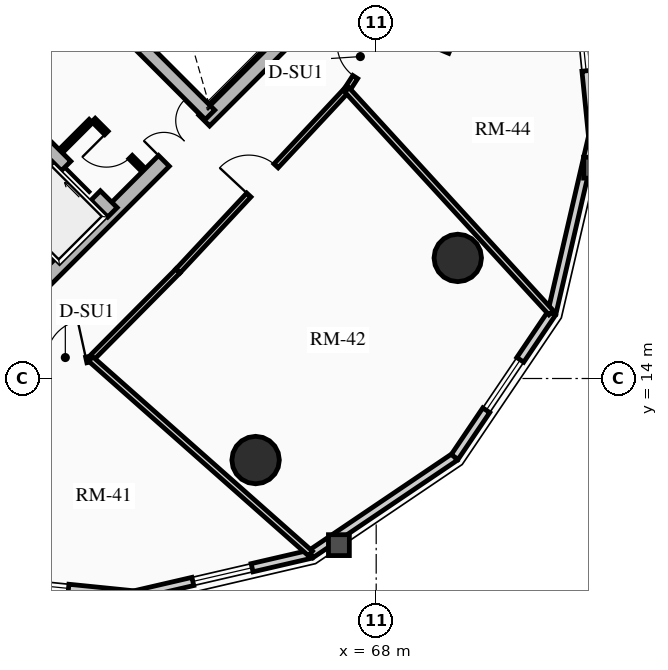
"""IFC4 building model, lengths in metres.
Left out: names, types, materials, properties, quantities, classifications, styles, units other than length and angle.
Written with IfcOpenShell. Run it as: python <this file> out.ifc"""

import sys

from ifc_helpers import new_model, si_unit, direction, frame, frame_2d, origin, origin_2d, place, context, subcontext, project, spatial, rectangle, circle, extrude, source, transform, mapped, element, fill, save


model = new_model("IFC4")
c1 = context("Model", 3, precision=1e-05, world=origin(), true_north=direction((0.0, 1.0)))
c2 = subcontext(c1, "Body", "Model", "MODEL_VIEW")
j1 = project(units=[si_unit("LENGTHUNIT", "METRE"), si_unit("PLANEANGLEUNIT", "RADIAN")], contexts=[c1])
p1 = place(None, origin())
s1 = spatial("IfcSite", under=j1, at=p1, CompositionType="ELEMENT")
p2 = place(p1, origin())
s2 = spatial("IfcBuilding", under=s1, at=p2, CompositionType="ELEMENT")
p3 = place(p2, frame((0.0, 0.0, 157.42)))
s3 = spatial("IfcBuildingStorey", under=s2, at=p3, CompositionType="ELEMENT", Elevation=157.42)
p4 = place(p3, frame((58.561, 15.873, 0.0), z_axis=(0.0, 0.0, 1.0), x_axis=(0.707106781187, 0.707106781187, 0.0)))
e1 = element("IfcWall", 1, at=p4, inside=s3, PredefinedType="SHEAR", context=c2, shape_type="SweptSolid", body=[
    extrude(rectangle(XDim=10.7, YDim=0.4, at=frame_2d((5.35, 0.0))), origin(), (0.0, 0.0, 1.0), 2.91),
])
m1 = source(origin(), c2, "Body", "SweptSolid", [
    extrude(rectangle(XDim=1.5, YDim=2.02, at=frame_2d((0.75, 1.01))), frame((0.0, 0.21, 0.0), z_axis=(0.0, -1.0, 0.0), x_axis=(1.0, 0.0, 0.0)), (0.0, 0.0, 1.0), 0.42),
])
p5 = place(p4, frame((5.45, 0.0, 0.0)))
e2 = element("IfcOpeningElement", 2, at=p5, cuts=e1, PredefinedType="OPENING", context=c2, shape_type="MappedRepresentation", body=[
    mapped(m1, transform((0.0, 0.0, 0.0), x_axis=(1.0, 0.0, 0.0), y_axis=(0.0, 1.0, 0.0), z_axis=(0.0, 0.0, 1.0), scale=1.0)),
])
p6 = place(p3, frame((61.06, 18.373, 0.0), z_axis=(0.0, 0.0, 1.0), x_axis=(-0.707106781187, 0.707106781187, 0.0)))
e3 = element("IfcWall", 3, at=p6, inside=s3, PredefinedType="SHEAR", context=c2, shape_type="SweptSolid", body=[
    extrude(rectangle(XDim=13.7, YDim=0.35, at=frame_2d((6.85, 0.0))), origin(), (0.0, 0.0, 1.0), 2.91),
])
m2 = source(origin(), c2, "Body", "SweptSolid", [
    extrude(rectangle(XDim=1.1, YDim=2.015, at=frame_2d((0.55, 1.007))), frame((0.0, 0.185, 0.0), z_axis=(0.0, -1.0, 0.0), x_axis=(1.0, 0.0, 0.0)), (0.0, 0.0, 1.0), 0.37),
])
p7 = place(p6, frame((4.85, 0.0, 0.0)))
e4 = element("IfcOpeningElement", 4, at=p7, cuts=e3, PredefinedType="OPENING", context=c2, shape_type="MappedRepresentation", body=[
    mapped(m2, transform((0.0, 0.0, 0.0), x_axis=(1.0, 0.0, 0.0), y_axis=(0.0, 1.0, 0.0), z_axis=(0.0, 0.0, 1.0), scale=1.0)),
])
p8 = place(p6, frame((0.625, 0.0, 0.0)))
e5 = element("IfcOpeningElement", 5, at=p8, cuts=e3, PredefinedType="OPENING", context=c2, shape_type="MappedRepresentation", body=[
    mapped(m2, transform((0.0, 0.0, 0.0), x_axis=(1.0, 0.0, 0.0), y_axis=(0.0, 1.0, 0.0), z_axis=(0.0, 0.0, 1.0), scale=1.0)),
])
p9 = place(p6, frame((2.625, 0.0, 0.0)))
e6 = element("IfcOpeningElement", 6, at=p9, cuts=e3, PredefinedType="OPENING", context=c2, shape_type="MappedRepresentation", body=[
    mapped(m2, transform((0.0, 0.0, 0.0), x_axis=(1.0, 0.0, 0.0), y_axis=(0.0, 1.0, 0.0), z_axis=(0.0, 0.0, 1.0), scale=1.0)),
])
m3 = source(origin(), c2, "Body", "SweptSolid", [
    extrude(rectangle(XDim=1.15, YDim=2.02, at=frame_2d((0.575, 1.01))), frame((0.0, 0.185, 0.0), z_axis=(0.0, -1.0, 0.0), x_axis=(1.0, 0.0, 0.0)), (0.0, 0.0, 1.0), 0.37),
])
p10 = place(p6, frame((7.27, 0.0, 0.0)))
e7 = element("IfcOpeningElement", 7, at=p10, cuts=e3, PredefinedType="OPENING", context=c2, shape_type="MappedRepresentation", body=[
    mapped(m3, transform((0.0, 0.0, 0.0), x_axis=(1.0, 0.0, 0.0), y_axis=(0.0, 1.0, 0.0), z_axis=(0.0, 0.0, 1.0), scale=1.0)),
])
p11 = place(p3, frame((63.627, 20.94, 0.0), z_axis=(0.0, 0.0, 1.0), x_axis=(-0.707119496762, 0.707094065383, 0.0)))
e8 = element("IfcWall", 8, at=p11, inside=s3, PredefinedType="SHEAR", context=c2, shape_type="SweptSolid", body=[
    extrude(rectangle(XDim=9.6, YDim=0.35, at=frame_2d((4.8, 0.0))), origin(), (0.0, 0.0, 1.0), 2.91),
])
p12 = place(p11, frame((5.28, 0.0, 0.0)))
e9 = element("IfcOpeningElement", 9, at=p12, cuts=e8, PredefinedType="OPENING", context=c2, shape_type="MappedRepresentation", body=[
    mapped(m3, transform((0.0, 0.0, 0.0), x_axis=(1.0, 0.0, 0.0), y_axis=(0.0, 1.0, 0.0), z_axis=(0.0, 0.0, 1.0), scale=1.0)),
])
for number, where, z_axis, x_axis in (
    (10, (64.827, 11.854, 0.0), (0.0, 0.0, 1.0), (1.0, 0.0, 0.0)),
    (11, (70.146, 17.173, 0.0), (0.0, 0.0, 1.0), (1.0, 0.0, 0.0)),
):
    element("IfcColumn", number, at=place(p3, frame(where, z_axis=z_axis, x_axis=x_axis)), inside=s3, PredefinedType="USERDEFINED", context=c2, shape_type="SweptSolid", body=[
        extrude(circle(Radius=0.625, at=origin_2d()), origin(), (0.0, 0.0, 1.0), 2.91),
    ])
p13 = place(p3, frame((61.633, 8.302, 0.0), z_axis=(0.0, 0.0, 1.0), x_axis=(-0.994959267396, 0.100279889424, 0.0)))
e12 = element("IfcWall", 12, at=p13, inside=s3, PredefinedType="SOLIDWALL", context=c2, shape_type="SweptSolid", body=[
    extrude(rectangle(XDim=5.076, YDim=0.22, at=frame_2d((2.538, 0.0))), origin(), (0.0, 0.0, 1.0), 2.245),
])
m4 = source(origin(), c2, "Body", "SweptSolid", [
    extrude(rectangle(XDim=1.6, YDim=1.3, at=frame_2d((0.8, 0.65))), frame((0.0, 0.12, 0.0), z_axis=(0.0, -1.0, 0.0), x_axis=(1.0, 0.0, 0.0)), (0.0, 0.0, 1.0), 0.24),
])
p14 = place(p13, frame((1.738, 0.0, 0.65)))
e13 = element("IfcOpeningElement", 13, at=p14, cuts=e12, PredefinedType="OPENING", context=c2, shape_type="MappedRepresentation", body=[
    mapped(m4, transform((0.0, 0.0, 0.0), x_axis=(1.0, 0.0, 0.0), y_axis=(0.0, 1.0, 0.0), z_axis=(0.0, 0.0, 1.0), scale=1.0)),
])
p15 = place(p3, frame((66.279, 9.378, 0.0), z_axis=(0.0, 0.0, 1.0), x_axis=(-0.974206226622, -0.225659540039, 0.0)))
e14 = element("IfcWall", 14, at=p15, inside=s3, PredefinedType="SOLIDWALL", context=c2, shape_type="SweptSolid", body=[
    extrude(rectangle(XDim=4.769, YDim=0.22, at=frame_2d((2.385, 0.0))), origin(), (0.0, 0.0, 1.0), 2.245),
])
p16 = place(p15, frame((1.585, 0.0, 0.65)))
e15 = element("IfcOpeningElement", 15, at=p16, cuts=e14, PredefinedType="OPENING", context=c2, shape_type="MappedRepresentation", body=[
    mapped(m4, transform((0.0, 0.0, 0.0), x_axis=(1.0, 0.0, 0.0), y_axis=(0.0, 1.0, 0.0), z_axis=(0.0, 0.0, 1.0), scale=1.0)),
])
p17 = place(p3, frame((70.065, 11.935, 0.0), z_axis=(0.0, 0.0, 1.0), x_axis=(-0.828739009952, -0.559635286042, 0.0)))
e16 = element("IfcWall", 16, at=p17, inside=s3, PredefinedType="SOLIDWALL", context=c2, shape_type="SweptSolid", body=[
    extrude(rectangle(XDim=4.569, YDim=0.22, at=frame_2d((2.284, 0.0))), origin(), (0.0, 0.0, 1.0), 2.245),
])
p18 = place(p3, frame((72.622, 15.721, 0.0), z_axis=(0.0, 0.0, 1.0), x_axis=(-0.559635286042, -0.828739009952, 0.0)))
e17 = element("IfcWall", 17, at=p18, inside=s3, PredefinedType="SOLIDWALL", context=c2, shape_type="SweptSolid", body=[
    extrude(rectangle(XDim=4.569, YDim=0.22, at=frame_2d((2.284, 0.0))), origin(), (0.0, 0.0, 1.0), 2.245),
])
p19 = place(p18, frame((1.484, 0.0, 0.65)))
e18 = element("IfcOpeningElement", 18, at=p19, cuts=e17, PredefinedType="OPENING", context=c2, shape_type="MappedRepresentation", body=[
    mapped(m4, transform((0.0, 0.0, 0.0), x_axis=(1.0, 0.0, 0.0), y_axis=(0.0, 1.0, 0.0), z_axis=(0.0, 0.0, 1.0), scale=1.0)),
])
p20 = place(p3, frame((73.698, 20.367, 0.0), z_axis=(0.0, 0.0, 1.0), x_axis=(-0.225659540039, -0.974206226622, 0.0)))
e19 = element("IfcWall", 19, at=p20, inside=s3, PredefinedType="SOLIDWALL", context=c2, shape_type="SweptSolid", body=[
    extrude(rectangle(XDim=4.769, YDim=0.22, at=frame_2d((2.385, 0.0))), origin(), (0.0, 0.0, 1.0), 2.245),
])
p21 = place(p3, frame((73.189, 25.418, 0.0), z_axis=(0.0, 0.0, 1.0), x_axis=(0.100279889424, -0.994959267396, 0.0)))
e20 = element("IfcWall", 20, at=p21, inside=s3, PredefinedType="SOLIDWALL", context=c2, shape_type="SweptSolid", body=[
    extrude(rectangle(XDim=5.076, YDim=0.22, at=frame_2d((2.538, 0.0))), origin(), (0.0, 0.0, 1.0), 2.245),
])
p22 = place(p21, frame((1.738, 0.0, 0.65)))
e21 = element("IfcOpeningElement", 21, at=p22, cuts=e20, PredefinedType="OPENING", context=c2, shape_type="MappedRepresentation", body=[
    mapped(m4, transform((0.0, 0.0, 0.0), x_axis=(1.0, 0.0, 0.0), y_axis=(0.0, 1.0, 0.0), z_axis=(0.0, 0.0, 1.0), scale=1.0)),
])
p23 = place(p3, frame((58.214, 21.467, 0.0), z_axis=(0.0, 0.0, 1.0), x_axis=(0.707106781187, 0.707106781187, 0.0)))
e22 = element("IfcWall", 22, at=p23, inside=s3, PredefinedType="PARTITIONING", context=c2, shape_type="SweptSolid", body=[
    extrude(rectangle(XDim=3.28, YDim=0.2, at=frame_2d((1.64, 0.0))), origin(), (0.0, 0.0, 1.0), 2.675),
])
m5 = source(origin(), c2, "Body", "SweptSolid", [
    extrude(rectangle(XDim=1.5, YDim=2.02, at=frame_2d((0.75, 1.01))), frame((0.0, 0.11, 0.0), z_axis=(0.0, -1.0, 0.0), x_axis=(1.0, 0.0, 0.0)), (0.0, 0.0, 1.0), 0.22),
])
p24 = place(p23, frame((1.55, 0.0, 0.0)))
e23 = element("IfcOpeningElement", 23, at=p24, cuts=e22, PredefinedType="OPENING", context=c2, shape_type="MappedRepresentation", body=[
    mapped(m5, transform((0.0, 0.0, 0.0), x_axis=(1.0, 0.0, 0.0), y_axis=(0.0, 1.0, 0.0), z_axis=(0.0, 0.0, 1.0), scale=1.0)),
])
p25 = place(p3, frame((61.835, 19.529, 0.0), z_axis=(0.0, 0.0, 1.0), x_axis=(-0.707174592913, 0.707038962956, 0.0)))
e24 = element("IfcWall", 24, at=p25, inside=s3, PredefinedType="PARTITIONING", context=c2, shape_type="SweptSolid", body=[
    extrude(rectangle(XDim=1.8, YDim=0.125, at=frame_2d((0.9, 0.0))), origin(), (0.0, 0.0, 1.0), 2.675),
])
m6 = source(origin(), c2, "Body", "SweptSolid", [
    extrude(rectangle(XDim=0.9, YDim=2.005, at=frame_2d((0.45, 1.002))), frame((0.0, 0.073, 0.0), z_axis=(0.0, -1.0, 0.0), x_axis=(1.0, 0.0, 0.0)), (0.0, 0.0, 1.0), 0.145),
])
p26 = place(p25, frame((0.42, 0.0, 0.0)))
e25 = element("IfcOpeningElement", 25, at=p26, cuts=e24, PredefinedType="OPENING", context=c2, shape_type="MappedRepresentation", body=[
    mapped(m6, transform((0.0, 0.0, 0.0), x_axis=(1.0, 0.0, 0.0), y_axis=(0.0, 1.0, 0.0), z_axis=(0.0, 0.0, 1.0), scale=1.0)),
])
p27 = place(p3, frame((59.713, 19.996, 0.0), z_axis=(0.0, 0.0, 1.0), x_axis=(0.707217726, 0.706995818963, 0.0)))
e26 = element("IfcWall", 26, at=p27, inside=s3, PredefinedType="PARTITIONING", context=c2, shape_type="SweptSolid", body=[
    extrude(rectangle(XDim=1.1, YDim=0.125, at=frame_2d((0.55, 0.0))), origin(), (0.0, 0.0, 1.0), 2.675),
])
p28 = place(p3, frame((58.963, 14.18, 0.0), z_axis=(0.0, 0.0, 1.0), x_axis=(0.976826524015, 0.214032572243, 0.0)))
e27 = element("IfcWall", 27, at=p28, inside=s3, PredefinedType="PARTITIONING", context=c2, shape_type="SweptSolid", body=[
    extrude(rectangle(XDim=1.562, YDim=0.15, at=frame_2d((0.781, 0.0))), origin(), (0.0, 0.0, 1.0), 2.245),
])
m7 = source(origin(), c2, "Body", "SweptSolid", [
    extrude(rectangle(XDim=1.05, YDim=2.015, at=frame_2d((0.525, 1.007))), frame((0.0, 0.085, 0.0), z_axis=(0.0, -1.0, 0.0), x_axis=(1.0, 0.0, 0.0)), (0.0, 0.0, 1.0), 0.17),
])
p29 = place(p28, frame((0.392, 0.0, 0.0)))
e28 = element("IfcOpeningElement", 28, at=p29, cuts=e27, PredefinedType="OPENING", context=c2, shape_type="MappedRepresentation", body=[
    mapped(m7, transform((0.0, 0.0, 0.0), x_axis=(1.0, 0.0, 0.0), y_axis=(0.0, 1.0, 0.0), z_axis=(0.0, 0.0, 1.0), scale=1.0)),
])
p30 = place(p3, frame((60.488, 14.514, 0.0), z_axis=(0.0, 0.0, 1.0), x_axis=(0.703880260405, 0.71031864611, 0.0)))
e29 = element("IfcWall", 29, at=p30, inside=s3, PredefinedType="PARTITIONING", context=c2, shape_type="SweptSolid", body=[
    extrude(rectangle(XDim=3.261, YDim=0.15, at=frame_2d((1.63, 0.0))), origin(), (0.0, 0.0, 1.0), 2.245),
])
p31 = place(p3, frame((62.784, 16.83, 0.0), z_axis=(0.0, 0.0, 1.0), x_axis=(0.682240832942, 0.731127516831, 0.0)))
e30 = element("IfcWall", 30, at=p31, inside=s3, PredefinedType="PARTITIONING", context=c2, shape_type="SweptSolid", body=[
    extrude(rectangle(XDim=6.517, YDim=0.15, at=frame_2d((3.259, 0.0))), origin(), (0.0, 0.0, 1.0), 2.245),
])
p32 = place(p31, frame((2.734, 0.0, 0.0)))
e31 = element("IfcOpeningElement", 31, at=p32, cuts=e30, PredefinedType="OPENING", context=c2, shape_type="MappedRepresentation", body=[
    mapped(m7, transform((0.0, 0.0, 0.0), x_axis=(1.0, 0.0, 0.0), y_axis=(0.0, 1.0, 0.0), z_axis=(0.0, 0.0, 1.0), scale=1.0)),
])
p33 = place(p3, frame((67.23, 21.595, 0.0), z_axis=(0.0, 0.0, 1.0), x_axis=(0.543687770222, 0.839287560084, 0.0)))
e32 = element("IfcWall", 32, at=p33, inside=s3, PredefinedType="PARTITIONING", context=c2, shape_type="SweptSolid", body=[
    extrude(rectangle(XDim=1.855, YDim=0.15, at=frame_2d((0.927, 0.0))), origin(), (0.0, 0.0, 1.0), 2.245),
])
p34 = place(p33, frame((0.402, 0.0, 0.0)))
e33 = element("IfcOpeningElement", 33, at=p34, cuts=e32, PredefinedType="OPENING", context=c2, shape_type="MappedRepresentation", body=[
    mapped(m7, transform((0.0, 0.0, 0.0), x_axis=(1.0, 0.0, 0.0), y_axis=(0.0, 1.0, 0.0), z_axis=(0.0, 0.0, 1.0), scale=1.0)),
])
p35 = place(p3, frame((60.488, 14.514, 0.0), z_axis=(0.0, 0.0, 1.0), x_axis=(0.748740614849, -0.662863101761, 0.0)))
e34 = element("IfcWall", 34, at=p35, inside=s3, PredefinedType="PARTITIONING", context=c2, shape_type="SweptSolid", body=[
    extrude(rectangle(XDim=7.721, YDim=0.16, at=frame_2d((3.861, 0.0))), origin(), (0.0, 0.0, 1.0), 2.245),
])
p36 = place(p3, frame((67.23, 21.595, 0.0), z_axis=(0.0, 0.0, 1.0), x_axis=(0.67560509773, -0.737263692258, 0.0)))
e35 = element("IfcWall", 35, at=p36, inside=s3, PredefinedType="PARTITIONING", context=c2, shape_type="SweptSolid", body=[
    extrude(rectangle(XDim=7.955, YDim=0.16, at=frame_2d((3.978, 0.0))), origin(), (0.0, 0.0, 1.0), 2.245),
])
p37 = place(p3, frame((68.367, 23.271, 0.0), z_axis=(0.0, 0.0, 1.0), x_axis=(0.922420747941, -0.386186436541, 0.0)))
e36 = element("IfcWall", 36, at=p37, inside=s3, PredefinedType="PARTITIONING", context=c2, shape_type="SweptSolid", body=[
    extrude(rectangle(XDim=1.699, YDim=0.125, at=frame_2d((0.849, 0.0))), origin(), (0.0, 0.0, 1.0), 2.312),
])
m8 = source(origin(), c2, "Body", "SweptSolid", [
    extrude(rectangle(XDim=1.6, YDim=1.3, at=frame_2d((0.8, 0.65))), frame((0.0, 0.03, 0.0), z_axis=(0.0, -1.0, 0.0), x_axis=(1.0, 0.0, 0.0)), (0.0, 0.0, 1.0), 0.06),
])
p38 = place(p14, origin())
e37 = element("IfcWindow", 37, at=p38, inside=s3, PartitioningType="SINGLE_PANEL", PredefinedType="WINDOW", context=c2, shape_type="MappedRepresentation", body=[
    mapped(m8, transform((0.0, 0.0, 0.0), x_axis=(1.0, 0.0, 0.0), y_axis=(0.0, 1.0, 0.0), z_axis=(0.0, 0.0, 1.0), scale=1.0)),
])
fill(e13, e37)
p39 = place(p16, origin())
e38 = element("IfcWindow", 38, at=p39, inside=s3, PartitioningType="SINGLE_PANEL", PredefinedType="WINDOW", context=c2, shape_type="MappedRepresentation", body=[
    mapped(m8, transform((0.0, 0.0, 0.0), x_axis=(1.0, 0.0, 0.0), y_axis=(0.0, 1.0, 0.0), z_axis=(0.0, 0.0, 1.0), scale=1.0)),
])
fill(e15, e38)
p40 = place(p19, origin())
e39 = element("IfcWindow", 39, at=p40, inside=s3, PartitioningType="SINGLE_PANEL", PredefinedType="WINDOW", context=c2, shape_type="MappedRepresentation", body=[
    mapped(m8, transform((0.0, 0.0, 0.0), x_axis=(1.0, 0.0, 0.0), y_axis=(0.0, 1.0, 0.0), z_axis=(0.0, 0.0, 1.0), scale=1.0)),
])
fill(e18, e39)
p41 = place(p22, origin())
e40 = element("IfcWindow", 40, at=p41, inside=s3, PartitioningType="SINGLE_PANEL", PredefinedType="WINDOW", context=c2, shape_type="MappedRepresentation", body=[
    mapped(m8, transform((0.0, 0.0, 0.0), x_axis=(1.0, 0.0, 0.0), y_axis=(0.0, 1.0, 0.0), z_axis=(0.0, 0.0, 1.0), scale=1.0)),
])
fill(e21, e40)
m9 = source(origin(), c2, "Body", "SweptSolid", [
    extrude(rectangle(XDim=1.1, YDim=2.015, at=frame_2d((0.55, 1.007))), frame((0.0, 0.025, 0.0), z_axis=(0.0, -1.0, 0.0), x_axis=(1.0, 0.0, 0.0)), (0.0, 0.0, 1.0), 0.05),
])
p42 = place(p8, origin())
e41 = element("IfcDoor", 41, at=p42, inside=s3, OperationType="SLIDING_TO_RIGHT", PredefinedType="DOOR", context=c2, shape_type="MappedRepresentation", body=[
    mapped(m9, transform((0.0, 0.0, 0.0), x_axis=(1.0, 0.0, 0.0), y_axis=(0.0, 1.0, 0.0), z_axis=(0.0, 0.0, 1.0), scale=1.0)),
])
fill(e5, e41)
m10 = source(origin(), c2, "Body", "SweptSolid", [
    extrude(rectangle(XDim=1.5, YDim=2.02, at=frame_2d((0.75, 1.01))), frame((0.0, 0.025, 0.0), z_axis=(0.0, -1.0, 0.0), x_axis=(1.0, 0.0, 0.0)), (0.0, 0.0, 1.0), 0.05),
])
p43 = place(p5, origin())
e42 = element("IfcDoor", 42, at=p43, inside=s3, OperationType="DOUBLE_DOOR_SINGLE_SWING", PredefinedType="DOOR", context=c2, shape_type="MappedRepresentation", body=[
    mapped(m10, transform((0.0, 0.0, 0.0), x_axis=(1.0, 0.0, 0.0), y_axis=(0.0, 1.0, 0.0), z_axis=(0.0, 0.0, 1.0), scale=1.0)),
])
fill(e2, e42)
p44 = place(p24, origin())
e43 = element("IfcDoor", 43, at=p44, inside=s3, OperationType="DOUBLE_DOOR_SINGLE_SWING", PredefinedType="DOOR", context=c2, shape_type="MappedRepresentation", body=[
    mapped(m10, transform((0.0, 0.0, 0.0), x_axis=(1.0, 0.0, 0.0), y_axis=(0.0, 1.0, 0.0), z_axis=(0.0, 0.0, 1.0), scale=1.0)),
])
fill(e23, e43)
m11 = source(origin(), c2, "Body", "SweptSolid", [
    extrude(rectangle(XDim=0.9, YDim=2.005, at=frame_2d((0.45, 1.002))), frame((0.0, 0.025, 0.0), z_axis=(0.0, -1.0, 0.0), x_axis=(1.0, 0.0, 0.0)), (0.0, 0.0, 1.0), 0.05),
])
p45 = place(p26, origin())
e44 = element("IfcDoor", 44, at=p45, inside=s3, OperationType="SINGLE_SWING_RIGHT", PredefinedType="DOOR", context=c2, shape_type="MappedRepresentation", body=[
    mapped(m11, transform((0.0, 0.0, 0.0), x_axis=(1.0, 0.0, 0.0), y_axis=(0.0, 1.0, 0.0), z_axis=(0.0, 0.0, 1.0), scale=1.0)),
])
fill(e25, e44)
m12 = source(origin(), c2, "Body", "SweptSolid", [
    extrude(rectangle(XDim=1.05, YDim=2.015, at=frame_2d((0.525, 1.007))), frame((0.0, 0.025, 0.0), z_axis=(0.0, -1.0, 0.0), x_axis=(1.0, 0.0, 0.0)), (0.0, 0.0, 1.0), 0.05),
])
p46 = place(p29, origin())
e45 = element("IfcDoor", 45, at=p46, inside=s3, OperationType="SINGLE_SWING_RIGHT", PredefinedType="DOOR", context=c2, shape_type="MappedRepresentation", body=[
    mapped(m12, transform((0.0, 0.0, 0.0), x_axis=(1.0, 0.0, 0.0), y_axis=(0.0, 1.0, 0.0), z_axis=(0.0, 0.0, 1.0), scale=1.0)),
])
fill(e28, e45)
p47 = place(p32, origin())
e46 = element("IfcDoor", 46, at=p47, inside=s3, OperationType="SINGLE_SWING_LEFT", PredefinedType="DOOR", context=c2, shape_type="MappedRepresentation", body=[
    mapped(m12, transform((0.0, 0.0, 0.0), x_axis=(1.0, 0.0, 0.0), y_axis=(0.0, 1.0, 0.0), z_axis=(0.0, 0.0, 1.0), scale=1.0)),
])
fill(e31, e46)
p48 = place(p34, origin())
e47 = element("IfcDoor", 47, at=p48, inside=s3, OperationType="SINGLE_SWING_RIGHT", PredefinedType="DOOR", context=c2, shape_type="MappedRepresentation", body=[
    mapped(m12, transform((0.0, 0.0, 0.0), x_axis=(1.0, 0.0, 0.0), y_axis=(0.0, 1.0, 0.0), z_axis=(0.0, 0.0, 1.0), scale=1.0)),
])
fill(e33, e47)
save(model, sys.argv[1])
